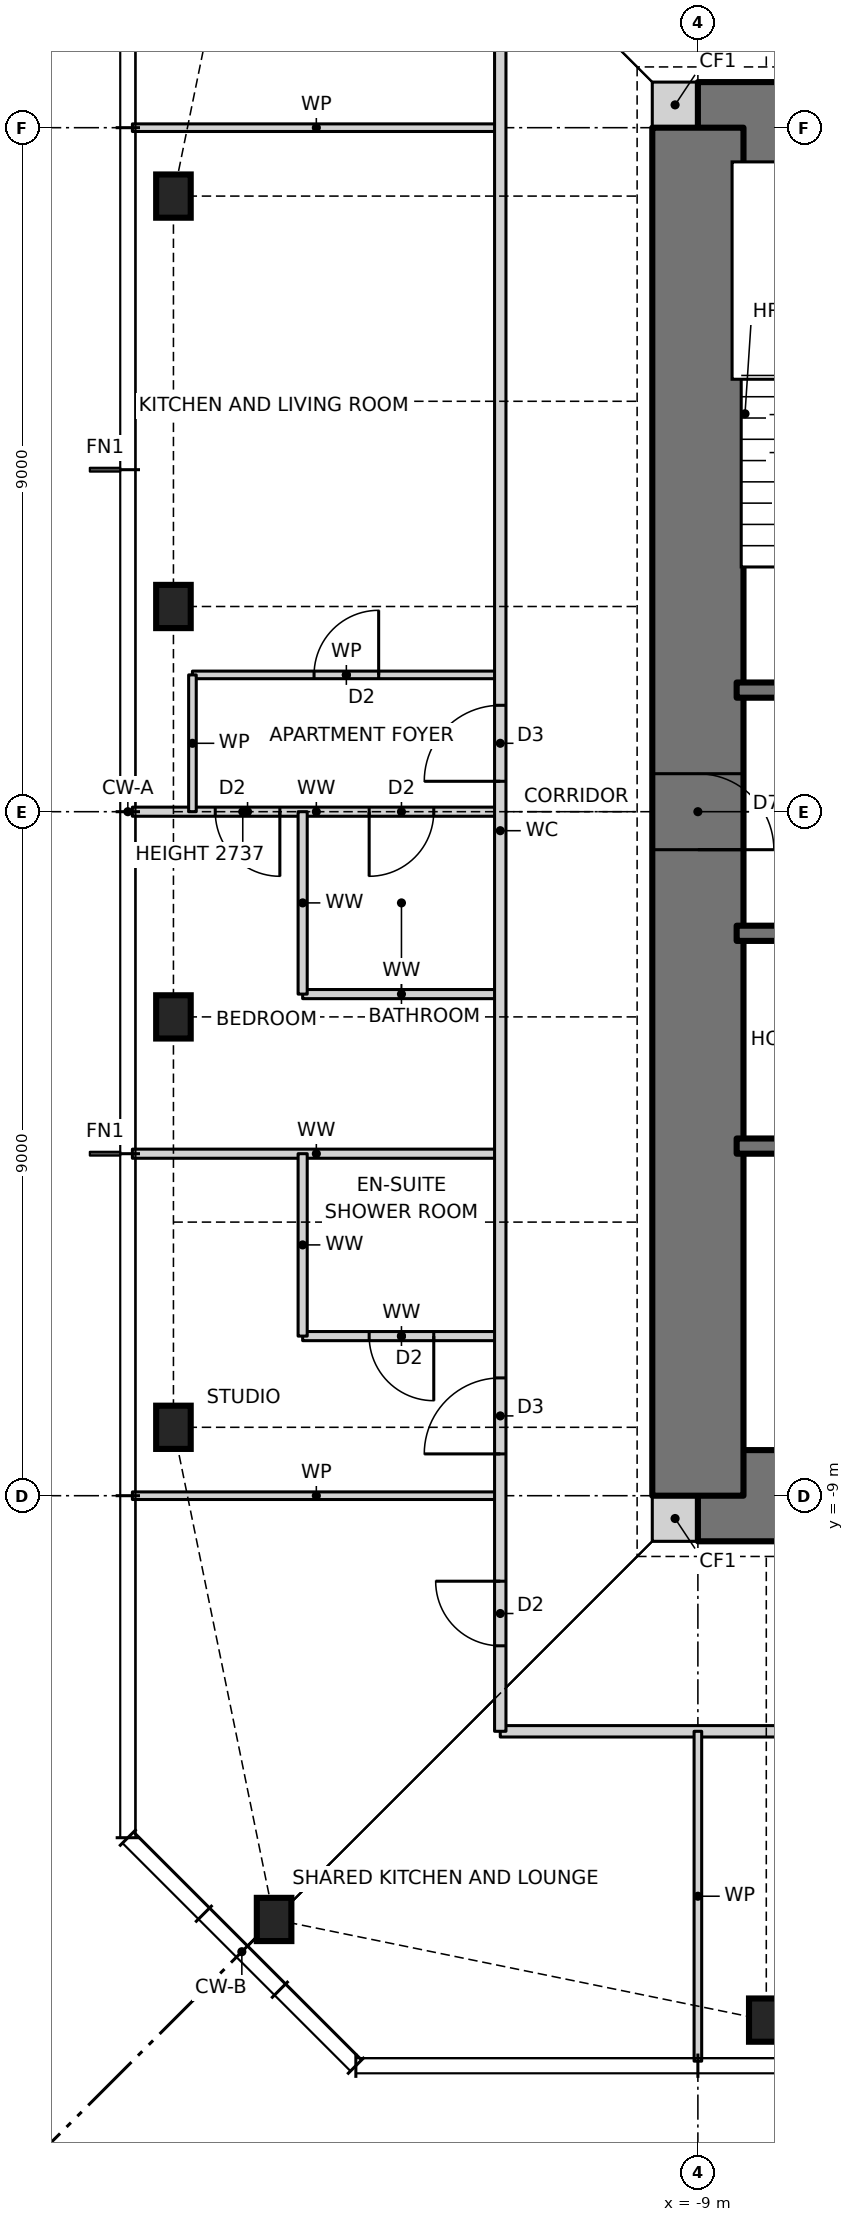
"""IFC4 building model, lengths in metres.
Left out: names, types, materials, properties, quantities, classifications, styles, units other than length and angle.
Written with IfcOpenShell. Run it as: python <this file> out.ifc"""

import sys

from ifc_helpers import new_model, si_unit, direction, frame, frame_2d, origin, origin_2d, place, context, subcontext, project, spatial, rectangle, i_section, extrude, element, fill, save


model = new_model("IFC4")
c1 = context("Model", 3, precision=1e-05, world=origin(), true_north=direction((0.0, 1.0)))
c2 = subcontext(c1, "Body", "Model", "MODEL_VIEW")
j1 = project(units=[si_unit("LENGTHUNIT", "METRE"), si_unit("PLANEANGLEUNIT", "RADIAN")], contexts=[c1])
p1 = place(None, origin())
s1 = spatial("IfcSite", under=j1, at=p1, CompositionType="ELEMENT")
p2 = place(p1, origin())
s2 = spatial("IfcBuilding", under=s1, at=p2, CompositionType="ELEMENT")
p3 = place(p2, frame((0.0, 0.0, 229.0)))
s3 = spatial("IfcBuildingStorey", under=s2, at=p3, CompositionType="ELEMENT", Elevation=229.0)
for number, where, z_axis, x_axis in (
    (1, (-14.576, -14.576, 0.0), (0.0, 0.0, 1.0), (1.0, 0.0, 0.0)),
    (2, (-8.1, -15.9, 0.0), (0.0, 0.0, 1.0), (1.0, 0.0, 0.0)),
    (3, (-15.9, 8.1, 0.0), (0.0, 0.0, 1.0), (1.0, 0.0, 0.0)),
    (4, (-15.9, 2.7, 0.0), (0.0, 0.0, 1.0), (1.0, 0.0, 0.0)),
    (5, (-15.9, -2.7, 0.0), (0.0, 0.0, 1.0), (1.0, 0.0, 0.0)),
    (6, (-15.9, -8.1, 0.0), (0.0, 0.0, 1.0), (1.0, 0.0, 0.0)),
):
    element("IfcColumn", number, at=place(p3, frame(where, z_axis=z_axis, x_axis=x_axis)), inside=s3, PredefinedType="COLUMN", context=c2, shape_type="SweptSolid", body=[
        extrude(i_section(OverallWidth=0.455, OverallDepth=0.569, WebThickness=0.078, FlangeThickness=0.125, at=origin_2d()), origin(), (0.0, 0.0, 1.0), 3.5),
    ])
for number, where, z_axis, x_axis in (
    (7, (-9.6, -9.3, 0.0), (0.0, 0.0, 1.0), (1.0, 0.0, 0.0)),
    (8, (-9.6, 9.3, 0.0), (0.0, 0.0, 1.0), (1.0, 0.0, 0.0)),
):
    element("IfcWall", number, at=place(p3, frame(where, z_axis=z_axis, x_axis=x_axis)), inside=s3, PredefinedType="SOLIDWALL", context=c2, shape_type="SweptSolid", body=[
        extrude(rectangle(XDim=0.6, YDim=0.6, at=frame_2d((0.3, 0.0))), origin(), (0.0, 0.0, 1.0), 3.5),
    ])
p4 = place(p3, frame((-9.0, -9.0, 0.0), z_axis=(0.0, 0.0, 1.0), x_axis=(1.0, 0.0, 0.0)))
e9 = element("IfcWall", 9, at=p4, inside=s3, PredefinedType="SHEAR", context=c2, shape_type="SweptSolid", body=[
    extrude(rectangle(XDim=18.0, YDim=1.2, at=frame_2d((9.0, 0.0))), origin(), (0.0, 0.0, 1.0), 3.5),
])
p5 = place(p4, frame((3.775, 0.0, 0.0)))
e10 = element("IfcOpeningElement", 10, at=p5, cuts=e9, PredefinedType="OPENING", context=c2, shape_type="SweptSolid", body=[
    extrude(rectangle(XDim=0.9, YDim=2.1, at=frame_2d((0.45, 1.05))), frame((0.0, 0.61, 0.0), z_axis=(0.0, -1.0, 0.0), x_axis=(1.0, 0.0, 0.0)), (0.0, 0.0, 1.0), 1.22),
])
p6 = place(p4, frame((10.625, 0.0, 0.0)))
e11 = element("IfcOpeningElement", 11, at=p6, cuts=e9, PredefinedType="OPENING", context=c2, shape_type="SweptSolid", body=[
    extrude(rectangle(XDim=0.9, YDim=2.1, at=frame_2d((0.45, 1.05))), frame((0.0, 0.61, 0.0), z_axis=(0.0, -1.0, 0.0), x_axis=(1.0, 0.0, 0.0)), (0.0, 0.0, 1.0), 1.22),
])
p7 = place(p3, frame((9.0, 9.0, 0.0), z_axis=(0.0, 0.0, 1.0), x_axis=(-1.0, 0.0, 0.0)))
e12 = element("IfcWall", 12, at=p7, inside=s3, PredefinedType="SHEAR", context=c2, shape_type="SweptSolid", body=[
    extrude(rectangle(XDim=18.0, YDim=1.2, at=frame_2d((9.0, 0.0))), origin(), (0.0, 0.0, 1.0), 3.5),
])
p8 = place(p7, frame((11.125, 0.0, 0.0)))
e13 = element("IfcOpeningElement", 13, at=p8, cuts=e12, PredefinedType="OPENING", context=c2, shape_type="SweptSolid", body=[
    extrude(rectangle(XDim=0.9, YDim=2.1, at=frame_2d((0.45, 1.05))), frame((0.0, 0.61, 0.0), z_axis=(0.0, -1.0, 0.0), x_axis=(1.0, 0.0, 0.0)), (0.0, 0.0, 1.0), 1.22),
])
p9 = place(p7, frame((4.275, 0.0, 0.0)))
e14 = element("IfcOpeningElement", 14, at=p9, cuts=e12, PredefinedType="OPENING", context=c2, shape_type="SweptSolid", body=[
    extrude(rectangle(XDim=0.9, YDim=2.1, at=frame_2d((0.45, 1.05))), frame((0.0, 0.61, 0.0), z_axis=(0.0, -1.0, 0.0), x_axis=(1.0, 0.0, 0.0)), (0.0, 0.0, 1.0), 1.22),
])
p10 = place(p3, frame((-9.0, 9.0, 0.0), z_axis=(0.0, 0.0, 1.0), x_axis=(0.0, -1.0, 0.0)))
e15 = element("IfcWall", 15, at=p10, inside=s3, PredefinedType="SHEAR", context=c2, shape_type="SweptSolid", body=[
    extrude(rectangle(XDim=18.0, YDim=1.2, at=frame_2d((9.0, 0.0))), origin(), (0.0, 0.0, 1.0), 3.5),
])
p11 = place(p10, frame((8.5, 0.0, 0.0)))
e16 = element("IfcOpeningElement", 16, at=p11, cuts=e15, PredefinedType="OPENING", context=c2, shape_type="SweptSolid", body=[
    extrude(rectangle(XDim=1.0, YDim=2.1, at=frame_2d((0.5, 1.05))), frame((0.0, 0.61, 0.0), z_axis=(0.0, -1.0, 0.0), x_axis=(1.0, 0.0, 0.0)), (0.0, 0.0, 1.0), 1.22),
])
p12 = place(p3, frame((-11.6, -12.1, 0.0), z_axis=(0.0, 0.0, 1.0), x_axis=(1.0, 0.0, 0.0)))
e17 = element("IfcWall", 17, at=p12, inside=s3, PredefinedType="PARTITIONING", context=c2, shape_type="SweptSolid", body=[
    extrude(rectangle(XDim=23.2, YDim=0.15, at=frame_2d((11.6, 0.0))), origin(), (0.0, 0.0, 1.0), 3.27),
])
p13 = place(p12, frame((10.2, 0.0, 0.0)))
e18 = element("IfcOpeningElement", 18, at=p13, cuts=e17, PredefinedType="OPENING", context=c2, shape_type="SweptSolid", body=[
    extrude(rectangle(XDim=1.0, YDim=2.1, at=frame_2d((0.5, 1.05))), frame((0.0, 0.085, 0.0), z_axis=(0.0, -1.0, 0.0), x_axis=(1.0, 0.0, 0.0)), (0.0, 0.0, 1.0), 0.17),
])
p14 = place(p12, frame((17.45, 0.0, 0.0)))
e19 = element("IfcOpeningElement", 19, at=p14, cuts=e17, PredefinedType="OPENING", context=c2, shape_type="SweptSolid", body=[
    extrude(rectangle(XDim=1.8, YDim=2.1, at=frame_2d((0.9, 1.05))), frame((0.0, 0.085, 0.0), z_axis=(0.0, -1.0, 0.0), x_axis=(1.0, 0.0, 0.0)), (0.0, 0.0, 1.0), 0.17),
])
p15 = place(p3, frame((-16.44, -9.0, 0.0), z_axis=(0.0, 0.0, 1.0), x_axis=(1.0, 0.0, 0.0)))
e20 = element("IfcWall", 20, at=p15, inside=s3, PredefinedType="PARTITIONING", context=c2, shape_type="SweptSolid", body=[
    extrude(rectangle(XDim=4.84, YDim=0.1, at=frame_2d((2.42, 0.0))), origin(), (0.0, 0.0, 1.0), 3.27),
])
p16 = place(p3, frame((-14.2, -6.9, 0.0), z_axis=(0.0, 0.0, 1.0), x_axis=(1.0, 0.0, 0.0)))
e21 = element("IfcWall", 21, at=p16, inside=s3, PredefinedType="PARTITIONING", context=c2, shape_type="SweptSolid", body=[
    extrude(rectangle(XDim=2.6, YDim=0.12, at=frame_2d((1.3, 0.0))), origin(), (0.0, 0.0, 1.0), 3.27),
])
p17 = place(p16, frame((0.875, 0.0, 0.0)))
e22 = element("IfcOpeningElement", 22, at=p17, cuts=e21, PredefinedType="OPENING", context=c2, shape_type="SweptSolid", body=[
    extrude(rectangle(XDim=0.85, YDim=2.1, at=frame_2d((0.425, 1.05))), frame((0.0, 0.07, 0.0), z_axis=(0.0, -1.0, 0.0), x_axis=(1.0, 0.0, 0.0)), (0.0, 0.0, 1.0), 0.14),
])
p18 = place(p3, frame((-16.44, -4.5, 0.0), z_axis=(0.0, 0.0, 1.0), x_axis=(1.0, 0.0, 0.0)))
e23 = element("IfcWall", 23, at=p18, inside=s3, PredefinedType="PARTITIONING", context=c2, shape_type="SweptSolid", body=[
    extrude(rectangle(XDim=4.84, YDim=0.12, at=frame_2d((2.42, 0.0))), origin(), (0.0, 0.0, 1.0), 3.27),
])
p19 = place(p3, frame((-8.49, -4.4, 0.0), z_axis=(0.0, 0.0, 1.0), x_axis=(1.0, 0.0, 0.0)))
e24 = element("IfcWall", 24, at=p19, inside=s3, PredefinedType="SOLIDWALL", context=c2, shape_type="SweptSolid", body=[
    extrude(rectangle(XDim=13.64, YDim=0.2, at=frame_2d((6.82, 0.0))), origin(), (0.0, 0.0, 1.0), 3.5),
])
p20 = place(p3, frame((-14.2, -2.4, 0.0), z_axis=(0.0, 0.0, 1.0), x_axis=(1.0, 0.0, 0.0)))
e25 = element("IfcWall", 25, at=p20, inside=s3, PredefinedType="PARTITIONING", context=c2, shape_type="SweptSolid", body=[
    extrude(rectangle(XDim=2.6, YDim=0.12, at=frame_2d((1.3, 0.0))), origin(), (0.0, 0.0, 1.0), 3.27),
])
p21 = place(p3, frame((-8.49, -1.6, 0.0), z_axis=(0.0, 0.0, 1.0), x_axis=(1.0, 0.0, 0.0)))
e26 = element("IfcWall", 26, at=p21, inside=s3, PredefinedType="SOLIDWALL", context=c2, shape_type="SweptSolid", body=[
    extrude(rectangle(XDim=16.98, YDim=0.2, at=frame_2d((8.49, 0.0))), origin(), (0.0, 0.0, 1.0), 3.5),
])
p22 = place(p21, frame((14.81, 0.0, 0.0)))
e27 = element("IfcOpeningElement", 27, at=p22, cuts=e26, PredefinedType="OPENING", context=c2, shape_type="SweptSolid", body=[
    extrude(rectangle(XDim=1.0, YDim=2.1, at=frame_2d((0.5, 1.05))), frame((0.0, 0.11, 0.0), z_axis=(0.0, -1.0, 0.0), x_axis=(1.0, 0.0, 0.0)), (0.0, 0.0, 1.0), 0.22),
])
p23 = place(p21, frame((1.232, 0.0, 0.0)))
e28 = element("IfcOpeningElement", 28, at=p23, cuts=e26, PredefinedType="OPENING", context=c2, shape_type="SweptSolid", body=[
    extrude(rectangle(XDim=0.9, YDim=2.1, at=frame_2d((0.45, 1.05))), frame((0.0, 0.11, 0.0), z_axis=(0.0, -1.0, 0.0), x_axis=(1.0, 0.0, 0.0)), (0.0, 0.0, 1.0), 0.22),
])
p24 = place(p21, frame((5.57, 0.0, 0.0)))
e29 = element("IfcOpeningElement", 29, at=p24, cuts=e26, PredefinedType="OPENING", context=c2, shape_type="SweptSolid", body=[
    extrude(rectangle(XDim=0.9, YDim=2.1, at=frame_2d((0.45, 1.05))), frame((0.0, 0.11, 0.0), z_axis=(0.0, -1.0, 0.0), x_axis=(1.0, 0.0, 0.0)), (0.0, 0.0, 1.0), 0.22),
])
p25 = place(p21, frame((3.857, 0.0, 0.0)))
e30 = element("IfcOpeningElement", 30, at=p25, cuts=e26, PredefinedType="OPENING", context=c2, shape_type="SweptSolid", body=[
    extrude(rectangle(XDim=0.9, YDim=2.1, at=frame_2d((0.45, 1.05))), frame((0.0, 0.11, 0.0), z_axis=(0.0, -1.0, 0.0), x_axis=(1.0, 0.0, 0.0)), (0.0, 0.0, 1.0), 0.22),
])
p26 = place(p21, frame((8.052, 0.0, 0.0)))
e31 = element("IfcOpeningElement", 31, at=p26, cuts=e26, PredefinedType="OPENING", context=c2, shape_type="SweptSolid", body=[
    extrude(rectangle(XDim=0.9, YDim=2.1, at=frame_2d((0.45, 1.05))), frame((0.0, 0.11, 0.0), z_axis=(0.0, -1.0, 0.0), x_axis=(1.0, 0.0, 0.0)), (0.0, 0.0, 1.0), 0.22),
])
p27 = place(p21, frame((11.478, 0.0, 0.0)))
e32 = element("IfcOpeningElement", 32, at=p27, cuts=e26, PredefinedType="OPENING", context=c2, shape_type="SweptSolid", body=[
    extrude(rectangle(XDim=0.9, YDim=2.1, at=frame_2d((0.45, 1.05))), frame((0.0, 0.11, 0.0), z_axis=(0.0, -1.0, 0.0), x_axis=(1.0, 0.0, 0.0)), (0.0, 0.0, 1.0), 0.22),
])
p28 = place(p3, frame((-16.44, 0.0, 0.0), z_axis=(0.0, 0.0, 1.0), x_axis=(1.0, 0.0, 0.0)))
e33 = element("IfcWall", 33, at=p28, inside=s3, PredefinedType="PARTITIONING", context=c2, shape_type="SweptSolid", body=[
    extrude(rectangle(XDim=4.84, YDim=0.12, at=frame_2d((2.42, 0.0))), origin(), (0.0, 0.0, 1.0), 2.737),
])
p29 = place(p28, frame((1.09, 0.0, 0.0)))
e34 = element("IfcOpeningElement", 34, at=p29, cuts=e33, PredefinedType="OPENING", context=c2, shape_type="SweptSolid", body=[
    extrude(rectangle(XDim=0.85, YDim=2.1, at=frame_2d((0.425, 1.05))), frame((0.0, 0.07, 0.0), z_axis=(0.0, -1.0, 0.0), x_axis=(1.0, 0.0, 0.0)), (0.0, 0.0, 1.0), 0.14),
])
p30 = place(p28, frame((3.115, 0.0, 0.0)))
e35 = element("IfcOpeningElement", 35, at=p30, cuts=e33, PredefinedType="OPENING", context=c2, shape_type="SweptSolid", body=[
    extrude(rectangle(XDim=0.85, YDim=2.1, at=frame_2d((0.425, 1.05))), frame((0.0, 0.07, 0.0), z_axis=(0.0, -1.0, 0.0), x_axis=(1.0, 0.0, 0.0)), (0.0, 0.0, 1.0), 0.14),
])
p31 = place(p3, frame((-8.49, 1.6, 0.0), z_axis=(0.0, 0.0, 1.0), x_axis=(1.0, 0.0, 0.0)))
e36 = element("IfcWall", 36, at=p31, inside=s3, PredefinedType="SOLIDWALL", context=c2, shape_type="SweptSolid", body=[
    extrude(rectangle(XDim=16.98, YDim=0.2, at=frame_2d((8.49, 0.0))), origin(), (0.0, 0.0, 1.0), 3.5),
])
p32 = place(p31, frame((1.17, 0.0, 0.0)))
e37 = element("IfcOpeningElement", 37, at=p32, cuts=e36, PredefinedType="OPENING", context=c2, shape_type="SweptSolid", body=[
    extrude(rectangle(XDim=1.0, YDim=2.1, at=frame_2d((0.5, 1.05))), frame((0.0, 0.11, 0.0), z_axis=(0.0, -1.0, 0.0), x_axis=(1.0, 0.0, 0.0)), (0.0, 0.0, 1.0), 0.22),
])
p33 = place(p31, frame((4.606, 0.0, 0.0)))
e38 = element("IfcOpeningElement", 38, at=p33, cuts=e36, PredefinedType="OPENING", context=c2, shape_type="SweptSolid", body=[
    extrude(rectangle(XDim=0.9, YDim=2.1, at=frame_2d((0.45, 1.05))), frame((0.0, 0.11, 0.0), z_axis=(0.0, -1.0, 0.0), x_axis=(1.0, 0.0, 0.0)), (0.0, 0.0, 1.0), 0.22),
])
p34 = place(p31, frame((8.04, 0.0, 0.0)))
e39 = element("IfcOpeningElement", 39, at=p34, cuts=e36, PredefinedType="OPENING", context=c2, shape_type="SweptSolid", body=[
    extrude(rectangle(XDim=0.9, YDim=2.1, at=frame_2d((0.45, 1.05))), frame((0.0, 0.11, 0.0), z_axis=(0.0, -1.0, 0.0), x_axis=(1.0, 0.0, 0.0)), (0.0, 0.0, 1.0), 0.22),
])
p35 = place(p31, frame((11.374, 0.0, 0.0)))
e40 = element("IfcOpeningElement", 40, at=p35, cuts=e36, PredefinedType="OPENING", context=c2, shape_type="SweptSolid", body=[
    extrude(rectangle(XDim=1.1, YDim=2.1, at=frame_2d((0.55, 1.05))), frame((0.0, 0.11, 0.0), z_axis=(0.0, -1.0, 0.0), x_axis=(1.0, 0.0, 0.0)), (0.0, 0.0, 1.0), 0.22),
])
p36 = place(p31, frame((14.66, 0.0, 0.0)))
e41 = element("IfcOpeningElement", 41, at=p36, cuts=e36, PredefinedType="OPENING", context=c2, shape_type="SweptSolid", body=[
    extrude(rectangle(XDim=1.3, YDim=2.1, at=frame_2d((0.65, 1.05))), frame((0.0, 0.11, 0.0), z_axis=(0.0, -1.0, 0.0), x_axis=(1.0, 0.0, 0.0)), (0.0, 0.0, 1.0), 0.22),
])
p37 = place(p3, frame((-15.65, 1.8, 0.0), z_axis=(0.0, 0.0, 1.0), x_axis=(1.0, 0.0, 0.0)))
e42 = element("IfcWall", 42, at=p37, inside=s3, PredefinedType="PARTITIONING", context=c2, shape_type="SweptSolid", body=[
    extrude(rectangle(XDim=4.05, YDim=0.1, at=frame_2d((2.025, 0.0))), origin(), (0.0, 0.0, 1.0), 3.27),
])
p38 = place(p37, frame((1.6, 0.0, 0.0)))
e43 = element("IfcOpeningElement", 43, at=p38, cuts=e42, PredefinedType="OPENING", context=c2, shape_type="SweptSolid", body=[
    extrude(rectangle(XDim=0.85, YDim=2.1, at=frame_2d((0.425, 1.05))), frame((0.0, 0.06, 0.0), z_axis=(0.0, -1.0, 0.0), x_axis=(1.0, 0.0, 0.0)), (0.0, 0.0, 1.0), 0.12),
])
p39 = place(p3, frame((-16.44, 9.0, 0.0), z_axis=(0.0, 0.0, 1.0), x_axis=(1.0, 0.0, 0.0)))
e44 = element("IfcWall", 44, at=p39, inside=s3, PredefinedType="PARTITIONING", context=c2, shape_type="SweptSolid", body=[
    extrude(rectangle(XDim=4.84, YDim=0.1, at=frame_2d((2.42, 0.0))), origin(), (0.0, 0.0, 1.0), 3.27),
])
p40 = place(p3, frame((-9.0, -16.44, 0.0), z_axis=(0.0, 0.0, 1.0), x_axis=(0.0, 1.0, 0.0)))
e45 = element("IfcWall", 45, at=p40, inside=s3, PredefinedType="PARTITIONING", context=c2, shape_type="SweptSolid", body=[
    extrude(rectangle(XDim=4.34, YDim=0.1, at=frame_2d((2.17, 0.0))), origin(), (0.0, 0.0, 1.0), 3.27),
])
p41 = place(p3, frame((-11.6, -12.1, 0.0), z_axis=(0.0, 0.0, 1.0), x_axis=(0.0, 1.0, 0.0)))
e46 = element("IfcWall", 46, at=p41, inside=s3, PredefinedType="PARTITIONING", context=c2, shape_type="SweptSolid", body=[
    extrude(rectangle(XDim=23.7, YDim=0.15, at=frame_2d((11.85, 0.0))), origin(), (0.0, 0.0, 1.0), 3.27),
])
p42 = place(p41, frame((12.5, 0.0, 0.0)))
e47 = element("IfcOpeningElement", 47, at=p42, cuts=e46, PredefinedType="OPENING", context=c2, shape_type="SweptSolid", body=[
    extrude(rectangle(XDim=1.0, YDim=2.1, at=frame_2d((0.5, 1.05))), frame((0.0, 0.085, 0.0), z_axis=(0.0, -1.0, 0.0), x_axis=(1.0, 0.0, 0.0)), (0.0, 0.0, 1.0), 0.17),
])
p43 = place(p41, frame((3.65, 0.0, 0.0)))
e48 = element("IfcOpeningElement", 48, at=p43, cuts=e46, PredefinedType="OPENING", context=c2, shape_type="SweptSolid", body=[
    extrude(rectangle(XDim=1.0, YDim=2.1, at=frame_2d((0.5, 1.05))), frame((0.0, 0.085, 0.0), z_axis=(0.0, -1.0, 0.0), x_axis=(1.0, 0.0, 0.0)), (0.0, 0.0, 1.0), 0.17),
])
p44 = place(p41, frame((1.125, 0.0, 0.0)))
e49 = element("IfcOpeningElement", 49, at=p44, cuts=e46, PredefinedType="OPENING", context=c2, shape_type="SweptSolid", body=[
    extrude(rectangle(XDim=0.85, YDim=2.1, at=frame_2d((0.425, 1.05))), frame((0.0, 0.085, 0.0), z_axis=(0.0, -1.0, 0.0), x_axis=(1.0, 0.0, 0.0)), (0.0, 0.0, 1.0), 0.17),
])
for number, where, z_axis, x_axis in (
    (50, (-14.2, -6.9, 0.0), (0.0, 0.0, 1.0), (0.0, 1.0, 0.0)),
    (51, (-14.2, -2.4, 0.0), (0.0, 0.0, 1.0), (0.0, 1.0, 0.0)),
):
    element("IfcWall", number, at=place(p3, frame(where, z_axis=z_axis, x_axis=x_axis)), inside=s3, PredefinedType="PARTITIONING", context=c2, shape_type="SweptSolid", body=[
        extrude(rectangle(XDim=2.4, YDim=0.12, at=frame_2d((1.2, 0.0))), origin(), (0.0, 0.0, 1.0), 3.27),
    ])
p45 = place(p3, frame((-15.65, 0.0, 0.0), z_axis=(0.0, 0.0, 1.0), x_axis=(0.0, 1.0, 0.0)))
e52 = element("IfcWall", 52, at=p45, inside=s3, PredefinedType="PARTITIONING", context=c2, shape_type="SweptSolid", body=[
    extrude(rectangle(XDim=1.8, YDim=0.1, at=frame_2d((0.9, 0.0))), origin(), (0.0, 0.0, 1.0), 3.27),
])
p46 = place(p42, origin())
e53 = element("IfcDoor", 53, at=p46, inside=s3, OperationType="SINGLE_SWING_LEFT", PredefinedType="DOOR", context=c2, shape_type="SweptSolid", body=[
    extrude(rectangle(XDim=1.0, YDim=2.1, at=frame_2d((0.5, 1.05))), frame((0.0, 0.025, 0.0), z_axis=(0.0, -1.0, 0.0), x_axis=(1.0, 0.0, 0.0)), (0.0, 0.0, 1.0), 0.05),
])
fill(e47, e53)
p47 = place(p38, origin())
e54 = element("IfcDoor", 54, at=p47, inside=s3, OperationType="SINGLE_SWING_RIGHT", PredefinedType="DOOR", context=c2, shape_type="SweptSolid", body=[
    extrude(rectangle(XDim=0.85, YDim=2.1, at=frame_2d((0.425, 1.05))), frame((0.0, 0.025, 0.0), z_axis=(0.0, -1.0, 0.0), x_axis=(1.0, 0.0, 0.0)), (0.0, 0.0, 1.0), 0.05),
])
fill(e43, e54)
p48 = place(p29, frame((0.85, 0.0, 0.0), z_axis=(0.0, 0.0, 1.0), x_axis=(-1.0, 0.0, 0.0)))
e55 = element("IfcDoor", 55, at=p48, inside=s3, OperationType="SINGLE_SWING_LEFT", PredefinedType="DOOR", context=c2, shape_type="SweptSolid", body=[
    extrude(rectangle(XDim=0.85, YDim=2.1, at=frame_2d((0.425, 1.05))), frame((0.0, 0.025, 0.0), z_axis=(0.0, -1.0, 0.0), x_axis=(1.0, 0.0, 0.0)), (0.0, 0.0, 1.0), 0.05),
])
fill(e34, e55)
p49 = place(p30, frame((0.85, 0.0, 0.0), z_axis=(0.0, 0.0, 1.0), x_axis=(-1.0, 0.0, 0.0)))
e56 = element("IfcDoor", 56, at=p49, inside=s3, OperationType="SINGLE_SWING_RIGHT", PredefinedType="DOOR", context=c2, shape_type="SweptSolid", body=[
    extrude(rectangle(XDim=0.85, YDim=2.1, at=frame_2d((0.425, 1.05))), frame((0.0, 0.025, 0.0), z_axis=(0.0, -1.0, 0.0), x_axis=(1.0, 0.0, 0.0)), (0.0, 0.0, 1.0), 0.05),
])
fill(e35, e56)
p50 = place(p43, origin())
e57 = element("IfcDoor", 57, at=p50, inside=s3, OperationType="SINGLE_SWING_LEFT", PredefinedType="DOOR", context=c2, shape_type="SweptSolid", body=[
    extrude(rectangle(XDim=1.0, YDim=2.1, at=frame_2d((0.5, 1.05))), frame((0.0, 0.025, 0.0), z_axis=(0.0, -1.0, 0.0), x_axis=(1.0, 0.0, 0.0)), (0.0, 0.0, 1.0), 0.05),
])
fill(e48, e57)
p51 = place(p17, frame((0.85, 0.0, 0.0), z_axis=(0.0, 0.0, 1.0), x_axis=(-1.0, 0.0, 0.0)))
e58 = element("IfcDoor", 58, at=p51, inside=s3, OperationType="SINGLE_SWING_LEFT", PredefinedType="DOOR", context=c2, shape_type="SweptSolid", body=[
    extrude(rectangle(XDim=0.85, YDim=2.1, at=frame_2d((0.425, 1.05))), frame((0.0, 0.025, 0.0), z_axis=(0.0, -1.0, 0.0), x_axis=(1.0, 0.0, 0.0)), (0.0, 0.0, 1.0), 0.05),
])
fill(e22, e58)
p52 = place(p44, origin())
e59 = element("IfcDoor", 59, at=p52, inside=s3, OperationType="SINGLE_SWING_RIGHT", PredefinedType="DOOR", context=c2, shape_type="SweptSolid", body=[
    extrude(rectangle(XDim=0.85, YDim=2.1, at=frame_2d((0.425, 1.05))), frame((0.0, 0.025, 0.0), z_axis=(0.0, -1.0, 0.0), x_axis=(1.0, 0.0, 0.0)), (0.0, 0.0, 1.0), 0.05),
])
fill(e49, e59)
p53 = place(p11, origin())
e60 = element("IfcDoor", 60, at=p53, inside=s3, OperationType="SINGLE_SWING_RIGHT", PredefinedType="DOOR", context=c2, shape_type="SweptSolid", body=[
    extrude(rectangle(XDim=1.0, YDim=2.1, at=frame_2d((0.5, 1.05))), frame((0.0, 0.025, 0.0), z_axis=(0.0, -1.0, 0.0), x_axis=(1.0, 0.0, 0.0)), (0.0, 0.0, 1.0), 0.05),
])
fill(e16, e60)
save(model, sys.argv[1])
